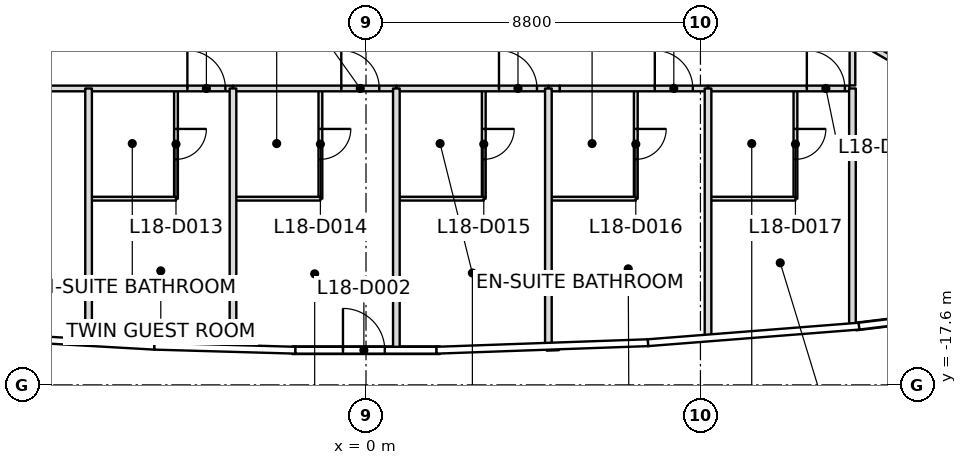
"""IFC4 building model, lengths in metres.
Left out: names, types, materials, properties, quantities, classifications, styles, units other than length and angle.
Written with IfcOpenShell. Run it as: python <this file> out.ifc"""

import sys

from ifc_helpers import new_model, si_unit, direction, frame, frame_2d, origin, place, context, subcontext, project, spatial, rectangle, extrude, element, fill, save


model = new_model("IFC4")
c1 = context("Model", 3, precision=1e-05, world=origin(), true_north=direction((0.0, 1.0)))
c2 = subcontext(c1, "Body", "Model", "MODEL_VIEW")
j1 = project(units=[si_unit("LENGTHUNIT", "METRE"), si_unit("PLANEANGLEUNIT", "RADIAN")], contexts=[c1])
p1 = place(None, origin())
s1 = spatial("IfcSite", under=j1, at=p1, CompositionType="ELEMENT")
p2 = place(p1, origin())
s2 = spatial("IfcBuilding", under=s1, at=p2, CompositionType="ELEMENT")
p3 = place(p2, frame((0.0, 0.0, 88.7)))
s3 = spatial("IfcBuildingStorey", under=s2, at=p3, CompositionType="ELEMENT", Elevation=88.7)
p4 = place(p3, frame((-1.946, -16.688, 0.0), z_axis=(0.0, 0.0, 1.0), x_axis=(1.0, 0.0, 0.0)))
e1 = element("IfcWall", 1, at=p4, inside=s3, PredefinedType="SOLIDWALL", context=c2, shape_type="SweptSolid", body=[
    extrude(rectangle(XDim=3.893, YDim=0.2, at=frame_2d((1.946, 0.0))), origin(), (0.0, 0.0, 1.0), 2.947),
])
p5 = place(p4, frame((1.34, 0.0, 0.0)))
e2 = element("IfcOpeningElement", 2, at=p5, cuts=e1, PredefinedType="OPENING", context=c2, shape_type="SweptSolid", body=[
    extrude(rectangle(XDim=1.1, YDim=2.1, at=frame_2d((0.55, 1.05))), frame((0.0, 0.1, 0.0), z_axis=(0.0, -1.0, 0.0), x_axis=(1.0, 0.0, 0.0)), (0.0, 0.0, 1.0), 0.2),
])
p6 = place(p3, frame((12.884, -16.065, 0.0), z_axis=(0.0, 0.0, 1.0), x_axis=(0.992689748885, 0.12069408626, 0.0)))
e3 = element("IfcWall", 3, at=p6, inside=s3, PredefinedType="SOLIDWALL", context=c2, shape_type="SweptSolid", body=[
    extrude(rectangle(XDim=5.749, YDim=0.2, at=frame_2d((2.875, 0.0))), origin(), (0.0, 0.0, 1.0), 3.04),
])
p7 = place(p6, frame((2.324, 0.0, 0.0)))
e4 = element("IfcOpeningElement", 4, at=p7, cuts=e3, PredefinedType="OPENING", context=c2, shape_type="SweptSolid", body=[
    extrude(rectangle(XDim=1.1, YDim=2.1, at=frame_2d((0.55, 1.05))), frame((0.0, 0.1, 0.0), z_axis=(0.0, -1.0, 0.0), x_axis=(1.0, 0.0, 0.0)), (0.0, 0.0, 1.0), 0.2),
])
p8 = place(p3, frame((-7.3, -9.8, 0.0), z_axis=(0.0, 0.0, 1.0), x_axis=(0.0, -1.0, 0.0)))
e5 = element("IfcWall", 5, at=p8, inside=s3, PredefinedType="PARTITIONING", context=c2, shape_type="SweptSolid", body=[
    extrude(rectangle(XDim=6.696, YDim=0.175, at=frame_2d((3.348, 0.0))), origin(), (0.0, 0.0, 1.0), 3.15),
])
p9 = place(p3, frame((-3.5, -9.8, 0.0), z_axis=(0.0, 0.0, 1.0), x_axis=(0.0, -1.0, 0.0)))
e6 = element("IfcWall", 6, at=p9, inside=s3, PredefinedType="PARTITIONING", context=c2, shape_type="SweptSolid", body=[
    extrude(rectangle(XDim=6.853, YDim=0.175, at=frame_2d((3.427, 0.0))), origin(), (0.0, 0.0, 1.0), 3.15),
])
p10 = place(p3, frame((0.799, -9.8, 0.0), z_axis=(0.0, 0.0, 1.0), x_axis=(0.0, -1.0, 0.0)))
e7 = element("IfcWall", 7, at=p10, inside=s3, PredefinedType="PARTITIONING", context=c2, shape_type="SweptSolid", body=[
    extrude(rectangle(XDim=6.892, YDim=0.175, at=frame_2d((3.446, 0.0))), origin(), (0.0, 0.0, 1.0), 3.15),
])
p11 = place(p3, frame((5.073, -16.6, 0.0), z_axis=(0.0, 0.0, 1.0), x_axis=(-0.99936861923, -0.035529746675, 0.0)))
e8 = element("IfcWall", 8, at=p11, inside=s3, PredefinedType="PARTITIONING", context=c2, shape_type="SweptSolid", body=[
    extrude(rectangle(XDim=0.323, YDim=0.175, at=frame_2d((0.162, 0.0))), origin(), (0.0, 0.0, 1.0), 3.017),
])
p12 = place(p3, frame((4.799, -9.8, 0.0), z_axis=(0.0, 0.0, 1.0), x_axis=(0.0, -1.0, 0.0)))
e9 = element("IfcWall", 9, at=p12, inside=s3, PredefinedType="PARTITIONING", context=c2, shape_type="SweptSolid", body=[
    extrude(rectangle(XDim=6.705, YDim=0.175, at=frame_2d((3.353, 0.0))), origin(), (0.0, 0.0, 1.0), 3.017),
])
p13 = place(p3, frame((9.0, -9.8, 0.0), z_axis=(0.0, 0.0, 1.0), x_axis=(0.0, -1.0, 0.0)))
e10 = element("IfcWall", 10, at=p13, inside=s3, PredefinedType="PARTITIONING", context=c2, shape_type="SweptSolid", body=[
    extrude(rectangle(XDim=6.589, YDim=0.175, at=frame_2d((3.294, 0.0))), origin(), (0.0, 0.0, 1.0), 3.15),
])
p14 = place(p3, frame((12.8, -9.8, 0.0), z_axis=(0.0, 0.0, 1.0), x_axis=(0.0, -1.0, 0.0)))
e11 = element("IfcWall", 11, at=p14, inside=s3, PredefinedType="PARTITIONING", context=c2, shape_type="SweptSolid", body=[
    extrude(rectangle(XDim=6.271, YDim=0.175, at=frame_2d((3.135, 0.0))), origin(), (0.0, 0.0, 1.0), 3.15),
])
p15 = place(p3, frame((-12.72, -9.8, 0.0), z_axis=(0.0, 0.0, 1.0), x_axis=(1.0, 0.0, 0.0)))
e12 = element("IfcWall", 12, at=p15, inside=s3, PredefinedType="PARTITIONING", context=c2, shape_type="SweptSolid", body=[
    extrude(rectangle(XDim=9.22, YDim=0.15, at=frame_2d((4.61, 0.0))), origin(), (0.0, 0.0, 1.0), 3.017),
])
p16 = place(p15, frame((3.37, 0.0, 0.0)))
e13 = element("IfcOpeningElement", 13, at=p16, cuts=e12, PredefinedType="OPENING", context=c2, shape_type="SweptSolid", body=[
    extrude(rectangle(XDim=1.0, YDim=2.1, at=frame_2d((0.5, 1.05))), frame((0.0, 0.075, 0.0), z_axis=(0.0, -1.0, 0.0), x_axis=(1.0, 0.0, 0.0)), (0.0, 0.0, 1.0), 0.15),
])
p17 = place(p15, frame((8.02, 0.0, 0.0)))
e14 = element("IfcOpeningElement", 14, at=p17, cuts=e12, PredefinedType="OPENING", context=c2, shape_type="SweptSolid", body=[
    extrude(rectangle(XDim=1.0, YDim=2.1, at=frame_2d((0.5, 1.05))), frame((0.0, 0.075, 0.0), z_axis=(0.0, -1.0, 0.0), x_axis=(1.0, 0.0, 0.0)), (0.0, 0.0, 1.0), 0.15),
])
p18 = place(p3, frame((-3.5, -9.8, 0.0), z_axis=(0.0, 0.0, 1.0), x_axis=(1.0, 0.0, 0.0)))
e15 = element("IfcWall", 15, at=p18, inside=s3, PredefinedType="PARTITIONING", context=c2, shape_type="SweptSolid", body=[
    extrude(rectangle(XDim=4.299, YDim=0.15, at=frame_2d((2.149, 0.0))), origin(), (0.0, 0.0, 1.0), 2.947),
])
p19 = place(p18, frame((2.85, 0.0, 0.0)))
e16 = element("IfcOpeningElement", 16, at=p19, cuts=e15, PredefinedType="OPENING", context=c2, shape_type="SweptSolid", body=[
    extrude(rectangle(XDim=1.0, YDim=2.1, at=frame_2d((0.5, 1.05))), frame((0.0, 0.075, 0.0), z_axis=(0.0, -1.0, 0.0), x_axis=(1.0, 0.0, 0.0)), (0.0, 0.0, 1.0), 0.15),
])
p20 = place(p3, frame((0.799, -9.8, 0.0), z_axis=(0.0, 0.0, 1.0), x_axis=(1.0, 0.0, 0.0)))
e17 = element("IfcWall", 17, at=p20, inside=s3, PredefinedType="PARTITIONING", context=c2, shape_type="SweptSolid", body=[
    extrude(rectangle(XDim=4.0, YDim=0.15, at=frame_2d((2.0, 0.0))), origin(), (0.0, 0.0, 1.0), 2.947),
])
p21 = place(p20, frame((2.7, 0.0, 0.0)))
e18 = element("IfcOpeningElement", 18, at=p21, cuts=e17, PredefinedType="OPENING", context=c2, shape_type="SweptSolid", body=[
    extrude(rectangle(XDim=1.0, YDim=2.1, at=frame_2d((0.5, 1.05))), frame((0.0, 0.075, 0.0), z_axis=(0.0, -1.0, 0.0), x_axis=(1.0, 0.0, 0.0)), (0.0, 0.0, 1.0), 0.15),
])
p22 = place(p3, frame((4.799, -9.8, 0.0), z_axis=(0.0, 0.0, 1.0), x_axis=(1.0, 0.0, 0.0)))
e19 = element("IfcWall", 19, at=p22, inside=s3, PredefinedType="PARTITIONING", context=c2, shape_type="SweptSolid", body=[
    extrude(rectangle(XDim=0.301, YDim=0.15, at=frame_2d((0.15, 0.0))), origin(), (0.0, 0.0, 1.0), 3.017),
])
p23 = place(p3, frame((5.1, -9.8, 0.0), z_axis=(0.0, 0.0, 1.0), x_axis=(1.0, 0.0, 0.0)))
e20 = element("IfcWall", 20, at=p23, inside=s3, PredefinedType="PARTITIONING", context=c2, shape_type="SweptSolid", body=[
    extrude(rectangle(XDim=3.9, YDim=0.15, at=frame_2d((1.95, 0.0))), origin(), (0.0, 0.0, 1.0), 3.15),
])
p24 = place(p23, frame((2.5, 0.0, 0.0)))
e21 = element("IfcOpeningElement", 21, at=p24, cuts=e20, PredefinedType="OPENING", context=c2, shape_type="SweptSolid", body=[
    extrude(rectangle(XDim=1.0, YDim=2.1, at=frame_2d((0.5, 1.05))), frame((0.0, 0.075, 0.0), z_axis=(0.0, -1.0, 0.0), x_axis=(1.0, 0.0, 0.0)), (0.0, 0.0, 1.0), 0.15),
])
p25 = place(p3, frame((9.0, -9.8, 0.0), z_axis=(0.0, 0.0, 1.0), x_axis=(1.0, 0.0, 0.0)))
e22 = element("IfcWall", 22, at=p25, inside=s3, PredefinedType="PARTITIONING", context=c2, shape_type="SweptSolid", body=[
    extrude(rectangle(XDim=3.72, YDim=0.15, at=frame_2d((1.86, 0.0))), origin(), (0.0, 0.0, 1.0), 3.017),
])
p26 = place(p25, frame((2.6, 0.0, 0.0)))
e23 = element("IfcOpeningElement", 23, at=p26, cuts=e22, PredefinedType="OPENING", context=c2, shape_type="SweptSolid", body=[
    extrude(rectangle(XDim=1.0, YDim=2.1, at=frame_2d((0.5, 1.05))), frame((0.0, 0.075, 0.0), z_axis=(0.0, -1.0, 0.0), x_axis=(1.0, 0.0, 0.0)), (0.0, 0.0, 1.0), 0.15),
])
p27 = place(p3, frame((12.8, -9.72, 0.0), z_axis=(0.0, 0.0, 1.0), x_axis=(0.0, 1.0, 0.0)))
e24 = element("IfcWall", 24, at=p27, inside=s3, PredefinedType="PARTITIONING", context=c2, shape_type="SweptSolid", body=[
    extrude(rectangle(XDim=1.291, YDim=0.15, at=frame_2d((0.646, 0.0))), origin(), (0.0, 0.0, 1.0), 2.797),
])
p28 = place(p3, frame((12.879, -8.475, 0.0), z_axis=(0.0, 0.0, 1.0), x_axis=(0.866025241123, -0.500000281738, 0.0)))
e25 = element("IfcWall", 25, at=p28, inside=s3, PredefinedType="PARTITIONING", context=c2, shape_type="SweptSolid", body=[
    extrude(rectangle(XDim=10.928, YDim=0.15, at=frame_2d((5.464, 0.0))), origin(), (0.0, 0.0, 1.0), 2.797),
])
p29 = place(p28, frame((4.918, 0.0, 0.0)))
e26 = element("IfcOpeningElement", 26, at=p29, cuts=e25, PredefinedType="OPENING", context=c2, shape_type="SweptSolid", body=[
    extrude(rectangle(XDim=1.0, YDim=2.1, at=frame_2d((0.5, 1.05))), frame((0.0, 0.075, 0.0), z_axis=(0.0, -1.0, 0.0), x_axis=(1.0, 0.0, 0.0)), (0.0, 0.0, 1.0), 0.15),
])
p30 = place(p3, frame((23.174, -12.34, 0.0), z_axis=(0.0, 0.0, 1.0), x_axis=(-0.866028448298, 0.49999472671, 0.0)))
e27 = element("IfcWall", 27, at=p30, inside=s3, PredefinedType="PARTITIONING", context=c2, shape_type="SweptSolid", body=[
    extrude(rectangle(XDim=11.979, YDim=0.15, at=frame_2d((5.99, 0.0))), origin(), (0.0, 0.0, 1.0), 2.947),
])
p31 = place(p30, frame((1.6, 0.0, 0.0)))
e28 = element("IfcOpeningElement", 28, at=p31, cuts=e27, PredefinedType="OPENING", context=c2, shape_type="SweptSolid", body=[
    extrude(rectangle(XDim=1.0, YDim=2.1, at=frame_2d((0.5, 1.05))), frame((0.0, 0.075, 0.0), z_axis=(0.0, -1.0, 0.0), x_axis=(1.0, 0.0, 0.0)), (0.0, 0.0, 1.0), 0.15),
])
p32 = place(p30, frame((6.929, 0.0, 0.0)))
e29 = element("IfcOpeningElement", 29, at=p32, cuts=e27, PredefinedType="OPENING", context=c2, shape_type="SweptSolid", body=[
    extrude(rectangle(XDim=1.0, YDim=2.1, at=frame_2d((0.5, 1.05))), frame((0.0, 0.075, 0.0), z_axis=(0.0, -1.0, 0.0), x_axis=(1.0, 0.0, 0.0)), (0.0, 0.0, 1.0), 0.15),
])
p33 = place(p3, frame((-5.0, -9.83, 0.0), z_axis=(0.0, 0.0, 1.0), x_axis=(0.0, -1.0, 0.0)))
e30 = element("IfcWall", 30, at=p33, inside=s3, PredefinedType="PARTITIONING", context=c2, shape_type="SweptSolid", body=[
    extrude(rectangle(XDim=2.87, YDim=0.1, at=frame_2d((1.435, 0.0))), origin(), (0.0, 0.0, 1.0), 3.017),
])
p34 = place(p33, frame((1.035, 0.0, 0.0)))
e31 = element("IfcOpeningElement", 31, at=p34, cuts=e30, PredefinedType="OPENING", context=c2, shape_type="SweptSolid", body=[
    extrude(rectangle(XDim=0.8, YDim=2.1, at=frame_2d((0.4, 1.05))), frame((0.0, 0.05, 0.0), z_axis=(0.0, -1.0, 0.0), x_axis=(1.0, 0.0, 0.0)), (0.0, 0.0, 1.0), 0.1),
])
p35 = place(p3, frame((-5.0, -12.7, 0.0), z_axis=(0.0, 0.0, 1.0), x_axis=(-1.0, 0.0, 0.0)))
e32 = element("IfcWall", 32, at=p35, inside=s3, PredefinedType="PARTITIONING", context=c2, shape_type="SweptSolid", body=[
    extrude(rectangle(XDim=2.27, YDim=0.1, at=frame_2d((1.135, 0.0))), origin(), (0.0, 0.0, 1.0), 3.15),
])
p36 = place(p3, frame((-1.2, -9.83, 0.0), z_axis=(0.0, 0.0, 1.0), x_axis=(0.0, -1.0, 0.0)))
e33 = element("IfcWall", 33, at=p36, inside=s3, PredefinedType="PARTITIONING", context=c2, shape_type="SweptSolid", body=[
    extrude(rectangle(XDim=2.87, YDim=0.1, at=frame_2d((1.435, 0.0))), origin(), (0.0, 0.0, 1.0), 3.15),
])
p37 = place(p36, frame((1.035, 0.0, 0.0)))
e34 = element("IfcOpeningElement", 34, at=p37, cuts=e33, PredefinedType="OPENING", context=c2, shape_type="SweptSolid", body=[
    extrude(rectangle(XDim=0.8, YDim=2.1, at=frame_2d((0.4, 1.05))), frame((0.0, 0.05, 0.0), z_axis=(0.0, -1.0, 0.0), x_axis=(1.0, 0.0, 0.0)), (0.0, 0.0, 1.0), 0.1),
])
p38 = place(p3, frame((-1.2, -12.7, 0.0), z_axis=(0.0, 0.0, 1.0), x_axis=(-1.0, 0.0, 0.0)))
e35 = element("IfcWall", 35, at=p38, inside=s3, PredefinedType="PARTITIONING", context=c2, shape_type="SweptSolid", body=[
    extrude(rectangle(XDim=2.27, YDim=0.1, at=frame_2d((1.135, 0.0))), origin(), (0.0, 0.0, 1.0), 2.947),
])
p39 = place(p3, frame((3.099, -9.83, 0.0), z_axis=(0.0, 0.0, 1.0), x_axis=(0.0, -1.0, 0.0)))
e36 = element("IfcWall", 36, at=p39, inside=s3, PredefinedType="PARTITIONING", context=c2, shape_type="SweptSolid", body=[
    extrude(rectangle(XDim=2.87, YDim=0.1, at=frame_2d((1.435, 0.0))), origin(), (0.0, 0.0, 1.0), 3.15),
])
p40 = place(p39, frame((1.035, 0.0, 0.0)))
e37 = element("IfcOpeningElement", 37, at=p40, cuts=e36, PredefinedType="OPENING", context=c2, shape_type="SweptSolid", body=[
    extrude(rectangle(XDim=0.8, YDim=2.1, at=frame_2d((0.4, 1.05))), frame((0.0, 0.05, 0.0), z_axis=(0.0, -1.0, 0.0), x_axis=(1.0, 0.0, 0.0)), (0.0, 0.0, 1.0), 0.1),
])
p41 = place(p3, frame((3.099, -12.7, 0.0), z_axis=(0.0, 0.0, 1.0), x_axis=(-1.0, 0.0, 0.0)))
e38 = element("IfcWall", 38, at=p41, inside=s3, PredefinedType="PARTITIONING", context=c2, shape_type="SweptSolid", body=[
    extrude(rectangle(XDim=2.27, YDim=0.1, at=frame_2d((1.135, 0.0))), origin(), (0.0, 0.0, 1.0), 2.947),
])
p42 = place(p3, frame((7.099, -9.83, 0.0), z_axis=(0.0, 0.0, 1.0), x_axis=(0.0, -1.0, 0.0)))
e39 = element("IfcWall", 39, at=p42, inside=s3, PredefinedType="PARTITIONING", context=c2, shape_type="SweptSolid", body=[
    extrude(rectangle(XDim=2.87, YDim=0.1, at=frame_2d((1.435, 0.0))), origin(), (0.0, 0.0, 1.0), 3.15),
])
p43 = place(p42, frame((1.035, 0.0, 0.0)))
e40 = element("IfcOpeningElement", 40, at=p43, cuts=e39, PredefinedType="OPENING", context=c2, shape_type="SweptSolid", body=[
    extrude(rectangle(XDim=0.8, YDim=2.1, at=frame_2d((0.4, 1.05))), frame((0.0, 0.05, 0.0), z_axis=(0.0, -1.0, 0.0), x_axis=(1.0, 0.0, 0.0)), (0.0, 0.0, 1.0), 0.1),
])
p44 = place(p3, frame((7.099, -12.7, 0.0), z_axis=(0.0, 0.0, 1.0), x_axis=(-1.0, 0.0, 0.0)))
e41 = element("IfcWall", 41, at=p44, inside=s3, PredefinedType="PARTITIONING", context=c2, shape_type="SweptSolid", body=[
    extrude(rectangle(XDim=2.27, YDim=0.1, at=frame_2d((1.135, 0.0))), origin(), (0.0, 0.0, 1.0), 3.017),
])
p45 = place(p3, frame((11.3, -9.83, 0.0), z_axis=(0.0, 0.0, 1.0), x_axis=(0.0, -1.0, 0.0)))
e42 = element("IfcWall", 42, at=p45, inside=s3, PredefinedType="PARTITIONING", context=c2, shape_type="SweptSolid", body=[
    extrude(rectangle(XDim=2.87, YDim=0.1, at=frame_2d((1.435, 0.0))), origin(), (0.0, 0.0, 1.0), 3.017),
])
p46 = place(p45, frame((1.035, 0.0, 0.0)))
e43 = element("IfcOpeningElement", 43, at=p46, cuts=e42, PredefinedType="OPENING", context=c2, shape_type="SweptSolid", body=[
    extrude(rectangle(XDim=0.8, YDim=2.1, at=frame_2d((0.4, 1.05))), frame((0.0, 0.05, 0.0), z_axis=(0.0, -1.0, 0.0), x_axis=(1.0, 0.0, 0.0)), (0.0, 0.0, 1.0), 0.1),
])
p47 = place(p3, frame((11.3, -12.7, 0.0), z_axis=(0.0, 0.0, 1.0), x_axis=(-1.0, 0.0, 0.0)))
e44 = element("IfcWall", 44, at=p47, inside=s3, PredefinedType="PARTITIONING", context=c2, shape_type="SweptSolid", body=[
    extrude(rectangle(XDim=2.27, YDim=0.1, at=frame_2d((1.135, 0.0))), origin(), (0.0, 0.0, 1.0), 3.017),
])
p48 = place(p5, origin())
e45 = element("IfcDoor", 45, at=p48, inside=s3, OperationType="SINGLE_SWING_LEFT", PredefinedType="DOOR", context=c2, shape_type="SweptSolid", body=[
    extrude(rectangle(XDim=1.1, YDim=2.1, at=frame_2d((0.55, 1.05))), frame((0.0, 0.025, 0.0), z_axis=(0.0, -1.0, 0.0), x_axis=(1.0, 0.0, 0.0)), (0.0, 0.0, 1.0), 0.05),
])
fill(e2, e45)
p49 = place(p17, origin())
e46 = element("IfcDoor", 46, at=p49, inside=s3, OperationType="SINGLE_SWING_LEFT", PredefinedType="DOOR", context=c2, shape_type="SweptSolid", body=[
    extrude(rectangle(XDim=1.0, YDim=2.1, at=frame_2d((0.5, 1.05))), frame((0.0, 0.025, 0.0), z_axis=(0.0, -1.0, 0.0), x_axis=(1.0, 0.0, 0.0)), (0.0, 0.0, 1.0), 0.05),
])
fill(e14, e46)
p50 = place(p34, origin())
e47 = element("IfcDoor", 47, at=p50, inside=s3, OperationType="SINGLE_SWING_RIGHT", PredefinedType="DOOR", context=c2, shape_type="SweptSolid", body=[
    extrude(rectangle(XDim=0.8, YDim=2.1, at=frame_2d((0.4, 1.05))), frame((0.0, 0.025, 0.0), z_axis=(0.0, -1.0, 0.0), x_axis=(1.0, 0.0, 0.0)), (0.0, 0.0, 1.0), 0.05),
])
fill(e31, e47)
p51 = place(p19, origin())
e48 = element("IfcDoor", 48, at=p51, inside=s3, OperationType="SINGLE_SWING_LEFT", PredefinedType="DOOR", context=c2, shape_type="SweptSolid", body=[
    extrude(rectangle(XDim=1.0, YDim=2.1, at=frame_2d((0.5, 1.05))), frame((0.0, 0.025, 0.0), z_axis=(0.0, -1.0, 0.0), x_axis=(1.0, 0.0, 0.0)), (0.0, 0.0, 1.0), 0.05),
])
fill(e16, e48)
p52 = place(p37, origin())
e49 = element("IfcDoor", 49, at=p52, inside=s3, OperationType="SINGLE_SWING_RIGHT", PredefinedType="DOOR", context=c2, shape_type="SweptSolid", body=[
    extrude(rectangle(XDim=0.8, YDim=2.1, at=frame_2d((0.4, 1.05))), frame((0.0, 0.025, 0.0), z_axis=(0.0, -1.0, 0.0), x_axis=(1.0, 0.0, 0.0)), (0.0, 0.0, 1.0), 0.05),
])
fill(e34, e49)
p53 = place(p21, origin())
e50 = element("IfcDoor", 50, at=p53, inside=s3, OperationType="SINGLE_SWING_LEFT", PredefinedType="DOOR", context=c2, shape_type="SweptSolid", body=[
    extrude(rectangle(XDim=1.0, YDim=2.1, at=frame_2d((0.5, 1.05))), frame((0.0, 0.025, 0.0), z_axis=(0.0, -1.0, 0.0), x_axis=(1.0, 0.0, 0.0)), (0.0, 0.0, 1.0), 0.05),
])
fill(e18, e50)
p54 = place(p40, origin())
e51 = element("IfcDoor", 51, at=p54, inside=s3, OperationType="SINGLE_SWING_LEFT", PredefinedType="DOOR", context=c2, shape_type="SweptSolid", body=[
    extrude(rectangle(XDim=0.8, YDim=2.1, at=frame_2d((0.4, 1.05))), frame((0.0, 0.025, 0.0), z_axis=(0.0, -1.0, 0.0), x_axis=(1.0, 0.0, 0.0)), (0.0, 0.0, 1.0), 0.05),
])
fill(e37, e51)
p55 = place(p24, origin())
e52 = element("IfcDoor", 52, at=p55, inside=s3, OperationType="SINGLE_SWING_LEFT", PredefinedType="DOOR", context=c2, shape_type="SweptSolid", body=[
    extrude(rectangle(XDim=1.0, YDim=2.1, at=frame_2d((0.5, 1.05))), frame((0.0, 0.025, 0.0), z_axis=(0.0, -1.0, 0.0), x_axis=(1.0, 0.0, 0.0)), (0.0, 0.0, 1.0), 0.05),
])
fill(e21, e52)
p56 = place(p43, origin())
e53 = element("IfcDoor", 53, at=p56, inside=s3, OperationType="SINGLE_SWING_LEFT", PredefinedType="DOOR", context=c2, shape_type="SweptSolid", body=[
    extrude(rectangle(XDim=0.8, YDim=2.1, at=frame_2d((0.4, 1.05))), frame((0.0, 0.025, 0.0), z_axis=(0.0, -1.0, 0.0), x_axis=(1.0, 0.0, 0.0)), (0.0, 0.0, 1.0), 0.05),
])
fill(e40, e53)
p57 = place(p26, origin())
e54 = element("IfcDoor", 54, at=p57, inside=s3, OperationType="SINGLE_SWING_LEFT", PredefinedType="DOOR", context=c2, shape_type="SweptSolid", body=[
    extrude(rectangle(XDim=1.0, YDim=2.1, at=frame_2d((0.5, 1.05))), frame((0.0, 0.025, 0.0), z_axis=(0.0, -1.0, 0.0), x_axis=(1.0, 0.0, 0.0)), (0.0, 0.0, 1.0), 0.05),
])
fill(e23, e54)
p58 = place(p46, origin())
e55 = element("IfcDoor", 55, at=p58, inside=s3, OperationType="SINGLE_SWING_RIGHT", PredefinedType="DOOR", context=c2, shape_type="SweptSolid", body=[
    extrude(rectangle(XDim=0.8, YDim=2.1, at=frame_2d((0.4, 1.05))), frame((0.0, 0.025, 0.0), z_axis=(0.0, -1.0, 0.0), x_axis=(1.0, 0.0, 0.0)), (0.0, 0.0, 1.0), 0.05),
])
fill(e43, e55)
save(model, sys.argv[1])
